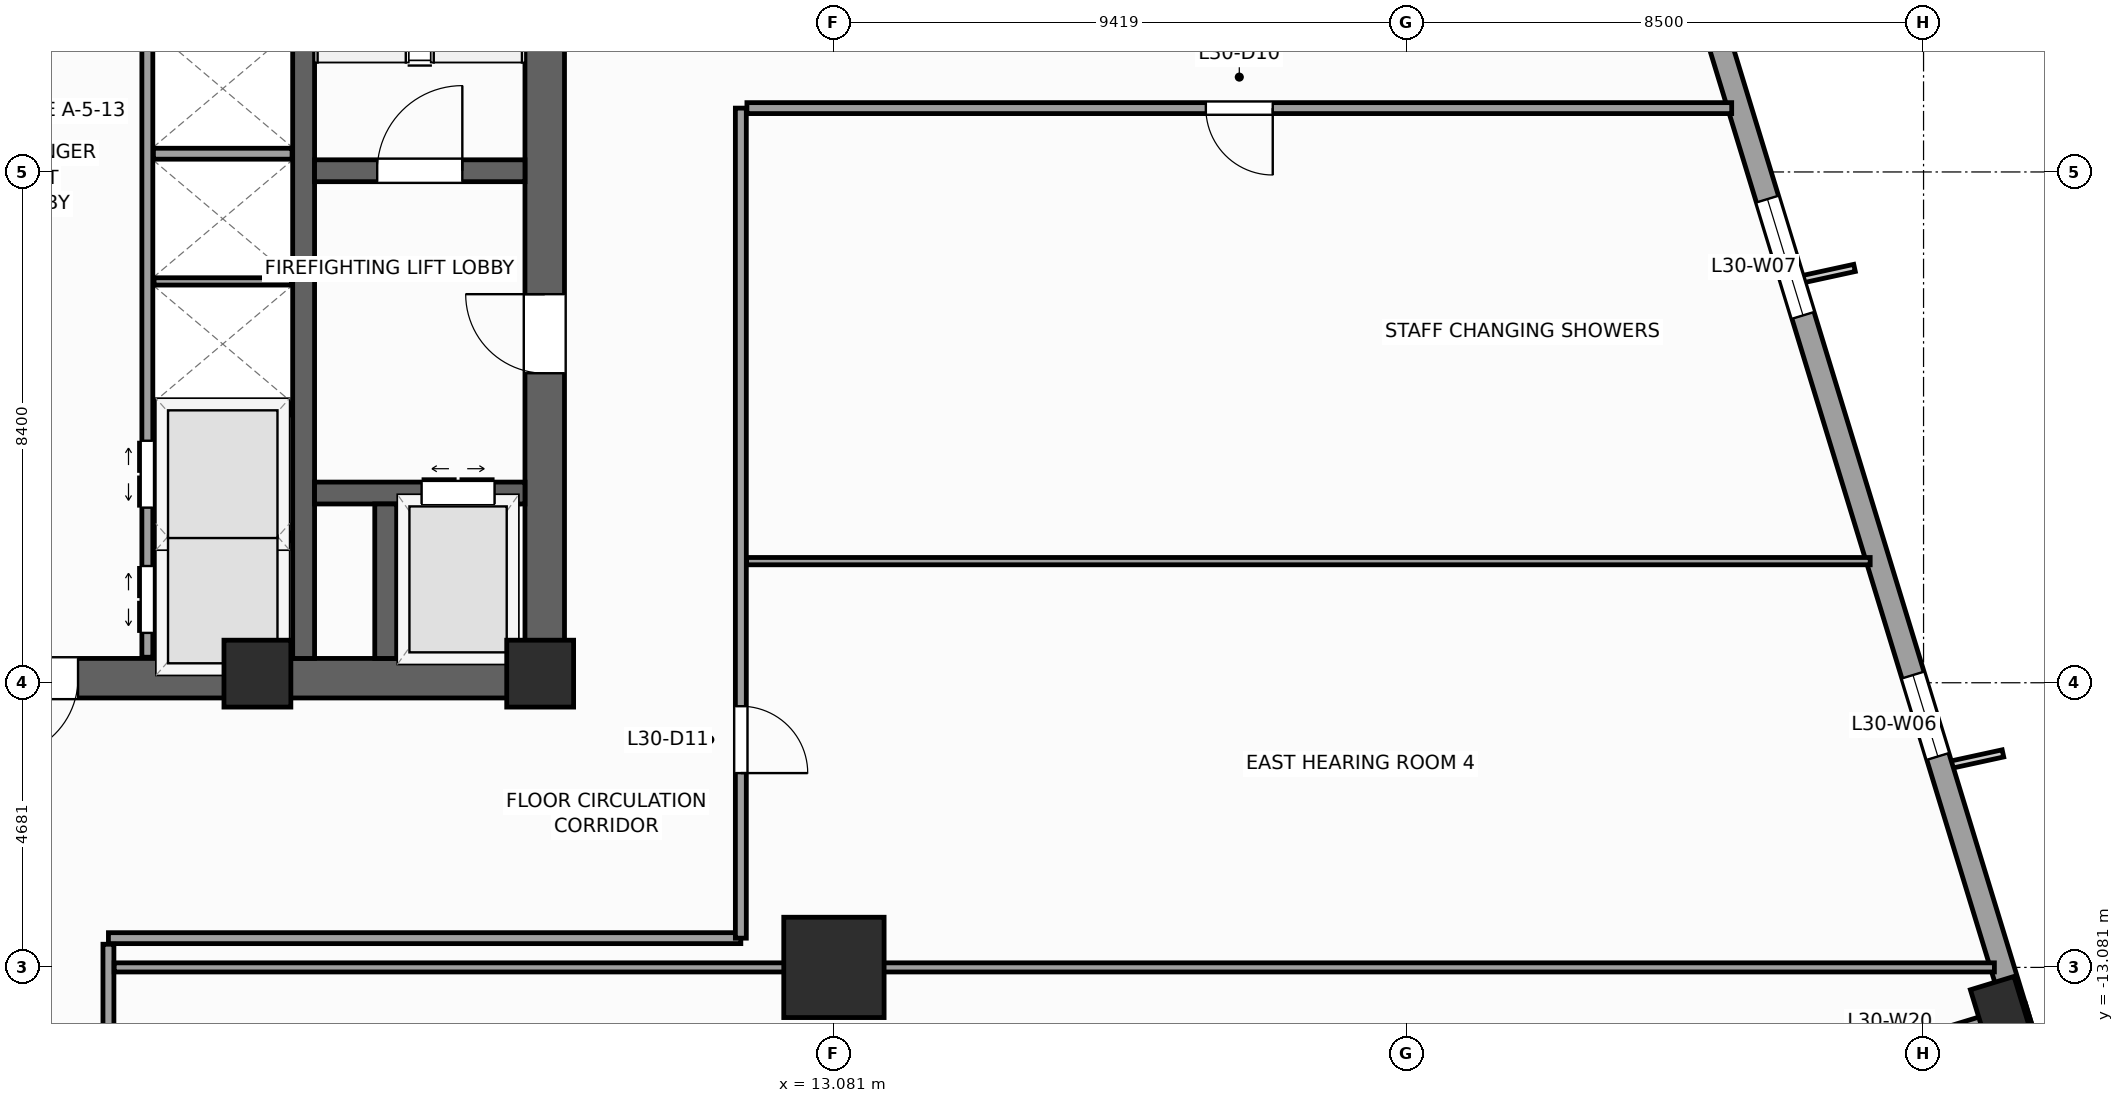
"""IFC4 building model, lengths in metres.
Left out: names, types, materials, properties, quantities, classifications, styles, units other than length and angle.
Written with IfcOpenShell. Run it as: python <this file> out.ifc"""

import sys

from ifc_helpers import new_model, si_unit, direction, frame, frame_2d, origin, origin_2d, place, context, subcontext, project, spatial, rectangle, extrude, source, transform, mapped, element, fill, save


model = new_model("IFC4")
c1 = context("Model", 3, precision=1e-05, world=origin(), true_north=direction((0.0, 1.0)))
c2 = subcontext(c1, "Body", "Model", "MODEL_VIEW")
j1 = project(units=[si_unit("LENGTHUNIT", "METRE"), si_unit("PLANEANGLEUNIT", "RADIAN")], contexts=[c1])
p1 = place(None, origin())
s1 = spatial("IfcSite", under=j1, at=p1, CompositionType="ELEMENT")
p2 = place(p1, origin())
s2 = spatial("IfcBuilding", under=s1, at=p2, CompositionType="ELEMENT")
p3 = place(p2, frame((0.0, 0.0, 127.2)))
s3 = spatial("IfcBuildingStorey", under=s2, at=p3, CompositionType="ELEMENT", Elevation=127.2)
p4 = place(p3, frame((-8.65, -8.325, 0.0), z_axis=(0.0, 0.0, 1.0), x_axis=(1.0, 0.0, 0.0)))
e1 = element("IfcWall", 1, at=p4, inside=s3, PredefinedType="SHEAR", context=c2, shape_type="SweptSolid", body=[
    extrude(rectangle(XDim=17.3, YDim=0.65, at=frame_2d((8.65, 0.0))), origin(), (0.0, 0.0, 1.0), 4.0),
])
p5 = place(p4, frame((8.0, 0.0, 0.0)))
e2 = element("IfcOpeningElement", 2, at=p5, cuts=e1, PredefinedType="OPENING", context=c2, shape_type="SweptSolid", body=[
    extrude(rectangle(XDim=1.3, YDim=2.2, at=frame_2d((0.65, 1.1))), frame((0.0, 0.335, 0.0), z_axis=(0.0, -1.0, 0.0), x_axis=(1.0, 0.0, 0.0)), (0.0, 0.0, 1.0), 0.67),
])
p6 = place(p3, frame((8.325, -8.0, 0.0), z_axis=(0.0, 0.0, 1.0), x_axis=(0.0, 1.0, 0.0)))
e3 = element("IfcWall", 3, at=p6, inside=s3, PredefinedType="SHEAR", context=c2, shape_type="SweptSolid", body=[
    extrude(rectangle(XDim=16.0, YDim=0.65, at=frame_2d((8.0, 0.0))), origin(), (0.0, 0.0, 1.0), 4.0),
])
p7 = place(p6, frame((4.69, 0.0, 0.0)))
e4 = element("IfcOpeningElement", 4, at=p7, cuts=e3, PredefinedType="OPENING", context=c2, shape_type="SweptSolid", body=[
    extrude(rectangle(XDim=1.3, YDim=2.2, at=frame_2d((0.65, 1.1))), frame((0.0, 0.335, 0.0), z_axis=(0.0, -1.0, 0.0), x_axis=(1.0, 0.0, 0.0)), (0.0, 0.0, 1.0), 0.67),
])
p8 = place(p3, frame((4.36, -8.0, 0.0), z_axis=(0.0, 0.0, 1.0), x_axis=(0.0, 1.0, 0.0)))
e5 = element("IfcWall", 5, at=p8, inside=s3, PredefinedType="SHEAR", context=c2, shape_type="SweptSolid", body=[
    extrude(rectangle(XDim=16.0, YDim=0.36, at=frame_2d((8.0, 0.0))), origin(), (0.0, 0.0, 1.0), 4.0),
])
p9 = place(p3, frame((4.54, 0.02, 0.0), z_axis=(0.0, 0.0, 1.0), x_axis=(1.0, 0.0, 0.0)))
e6 = element("IfcWall", 6, at=p9, inside=s3, PredefinedType="SHEAR", context=c2, shape_type="SweptSolid", body=[
    extrude(rectangle(XDim=3.46, YDim=0.36, at=frame_2d((1.73, 0.0))), origin(), (0.0, 0.0, 1.0), 4.0),
])
p10 = place(p9, frame((1.03, 0.0, 0.0)))
e7 = element("IfcOpeningElement", 7, at=p10, cuts=e6, PredefinedType="OPENING", context=c2, shape_type="SweptSolid", body=[
    extrude(rectangle(XDim=1.4, YDim=2.2, at=frame_2d((0.7, 1.1))), frame((0.0, 0.19, 0.0), z_axis=(0.0, -1.0, 0.0), x_axis=(1.0, 0.0, 0.0)), (0.0, 0.0, 1.0), 0.38),
])
p11 = place(p3, frame((4.54, -5.28, 0.0), z_axis=(0.0, 0.0, 1.0), x_axis=(1.0, 0.0, 0.0)))
e8 = element("IfcWall", 8, at=p11, inside=s3, PredefinedType="SHEAR", context=c2, shape_type="SweptSolid", body=[
    extrude(rectangle(XDim=3.46, YDim=0.36, at=frame_2d((1.73, 0.0))), origin(), (0.0, 0.0, 1.0), 4.0),
])
p12 = place(p11, frame((1.76, 0.0, 0.0)))
e9 = element("IfcOpeningElement", 9, at=p12, cuts=e8, PredefinedType="OPENING", context=c2, shape_type="SweptSolid", body=[
    extrude(rectangle(XDim=1.2, YDim=2.25, at=frame_2d((0.6, 1.125))), frame((0.0, 0.19, 0.0), z_axis=(0.0, -1.0, 0.0), x_axis=(1.0, 0.0, 0.0)), (0.0, 0.0, 1.0), 0.38),
])
p13 = place(p3, frame((5.71, -8.0, 0.0), z_axis=(0.0, 0.0, 1.0), x_axis=(0.0, 1.0, 0.0)))
e10 = element("IfcWall", 10, at=p13, inside=s3, PredefinedType="SHEAR", context=c2, shape_type="SweptSolid", body=[
    extrude(rectangle(XDim=2.54, YDim=0.36, at=frame_2d((1.27, 0.0))), origin(), (0.0, 0.0, 1.0), 4.0),
])
m1 = source(origin(), c2, "Body", "SweptSolid", [
    extrude(rectangle(XDim=1.1, YDim=1.1, at=origin_2d()), origin(), (0.0, 0.0, 1.0), 4.0),
])
for number, where, z_axis, x_axis in (
    (11, (8.25, -8.25, 0.0), (0.0, 0.0, 1.0), (1.0, 0.0, 0.0)),
    (12, (3.6, -8.25, 0.0), (0.0, 0.0, 1.0), (1.0, 0.0, 0.0)),
):
    element("IfcColumn", number, at=place(p3, frame(where, z_axis=z_axis, x_axis=x_axis)), inside=s3, PredefinedType="PILASTER", context=c2, shape_type="MappedRepresentation", body=[
        mapped(m1, transform((0.0, 0.0, 0.0), scale=1.0)),
    ])
m2 = source(origin(), c2, "Body", "SweptSolid", [
    extrude(rectangle(XDim=1.65, YDim=1.65, at=origin_2d()), origin(), (0.0, 0.0, 1.0), 4.0),
])
p14 = place(p3, frame((13.081, -13.081, 0.0), z_axis=(0.0, 0.0, 1.0), x_axis=(1.0, 0.0, 0.0)))
e13 = element("IfcColumn", 13, at=p14, inside=s3, PredefinedType="COLUMN", context=c2, shape_type="MappedRepresentation", body=[
    mapped(m2, transform((0.0, 0.0, 0.0), scale=1.0)),
])
m3 = source(origin(), c2, "Body", "SweptSolid", [
    extrude(rectangle(XDim=0.75, YDim=0.85, at=origin_2d()), origin(), (0.0, 0.0, 1.0), 4.0),
])
p15 = place(p3, frame((32.253, -13.746, 0.0), z_axis=(0.0, 0.0, 1.0), x_axis=(0.956304755963, 0.292371704723, 0.0)))
e14 = element("IfcColumn", 14, at=p15, inside=s3, PredefinedType="COLUMN", context=c2, shape_type="MappedRepresentation", body=[
    mapped(m3, transform((0.0, 0.0, 0.0), scale=1.0)),
])
p16 = place(p3, frame((28.482, -15.144, 0.0), z_axis=(0.0, 0.0, 1.0), x_axis=(0.956304176051, 0.292373601522, 0.0)))
e15 = element("IfcWall", 15, at=p16, inside=s3, PredefinedType="STANDARD", context=c2, shape_type="SweptSolid", body=[
    extrude(rectangle(XDim=4.44, YDim=0.38, at=frame_2d((2.22, 0.0))), origin(), (0.0, 0.0, 1.0), 3.04),
])
p17 = place(p16, frame((1.52, 0.0, 0.51)))
e16 = element("IfcOpeningElement", 16, at=p17, cuts=e15, PredefinedType="OPENING", context=c2, shape_type="SweptSolid", body=[
    extrude(rectangle(XDim=1.4, YDim=2.4, at=frame_2d((0.7, 1.2))), frame((0.0, 0.2, 0.0), z_axis=(0.0, -1.0, 0.0), x_axis=(1.0, 0.0, 0.0)), (0.0, 0.0, 1.0), 0.4),
])
p18 = place(p3, frame((32.658, -14.265, 0.0), z_axis=(0.0, 0.0, 1.0), x_axis=(-0.292373127906, 0.956304320851, 0.0)))
e17 = element("IfcWall", 17, at=p18, inside=s3, PredefinedType="STANDARD", context=c2, shape_type="SweptSolid", body=[
    extrude(rectangle(XDim=46.38, YDim=0.38, at=frame_2d((23.19, 0.0))), origin(), (0.0, 0.0, 1.0), 3.14),
])
p19 = place(p18, frame((4.865, 0.0, 0.51)))
e18 = element("IfcOpeningElement", 18, at=p19, cuts=e17, PredefinedType="OPENING", context=c2, shape_type="SweptSolid", body=[
    extrude(rectangle(XDim=1.4, YDim=2.4, at=frame_2d((0.7, 1.2))), frame((0.0, 0.2, 0.0), z_axis=(0.0, -1.0, 0.0), x_axis=(1.0, 0.0, 0.0)), (0.0, 0.0, 1.0), 0.4),
])
p20 = place(p18, frame((12.45, 0.0, 0.51)))
e19 = element("IfcOpeningElement", 19, at=p20, cuts=e17, PredefinedType="OPENING", context=c2, shape_type="SweptSolid", body=[
    extrude(rectangle(XDim=2.0, YDim=2.4, at=frame_2d((1.0, 1.2))), frame((0.0, 0.2, 0.0), z_axis=(0.0, -1.0, 0.0), x_axis=(1.0, 0.0, 0.0)), (0.0, 0.0, 1.0), 0.4),
])
p21 = place(p18, frame((30.538, 0.0, 0.51)))
e20 = element("IfcOpeningElement", 20, at=p21, cuts=e17, PredefinedType="OPENING", context=c2, shape_type="SweptSolid", body=[
    extrude(rectangle(XDim=2.0, YDim=2.4, at=frame_2d((1.0, 1.2))), frame((0.0, 0.2, 0.0), z_axis=(0.0, -1.0, 0.0), x_axis=(1.0, 0.0, 0.0)), (0.0, 0.0, 1.0), 0.4),
])
p22 = place(p18, frame((39.187, 0.0, 0.51)))
e21 = element("IfcOpeningElement", 21, at=p22, cuts=e17, PredefinedType="OPENING", context=c2, shape_type="SweptSolid", body=[
    extrude(rectangle(XDim=1.4, YDim=2.4, at=frame_2d((0.7, 1.2))), frame((0.0, 0.2, 0.0), z_axis=(0.0, -1.0, 0.0), x_axis=(1.0, 0.0, 0.0)), (0.0, 0.0, 1.0), 0.4),
])
p23 = place(p3, frame((1.79, -7.98, 0.0), z_axis=(0.0, 0.0, 1.0), x_axis=(0.0, 1.0, 0.0)))
e22 = element("IfcWall", 22, at=p23, inside=s3, PredefinedType="PARTITIONING", context=c2, shape_type="SweptSolid", body=[
    extrude(rectangle(XDim=12.38, YDim=0.18, at=frame_2d((6.19, 0.0))), origin(), (0.0, 0.0, 1.0), 3.74),
])
p24 = place(p23, frame((0.4, 0.0, 0.0)))
e23 = element("IfcOpeningElement", 23, at=p24, cuts=e22, PredefinedType="OPENING", context=c2, shape_type="SweptSolid", body=[
    extrude(rectangle(XDim=1.1, YDim=2.2, at=frame_2d((0.55, 1.1))), frame((0.0, 0.1, 0.0), z_axis=(0.0, -1.0, 0.0), x_axis=(1.0, 0.0, 0.0)), (0.0, 0.0, 1.0), 0.2),
])
p25 = place(p23, frame((2.46, 0.0, 0.0)))
e24 = element("IfcOpeningElement", 24, at=p25, cuts=e22, PredefinedType="OPENING", context=c2, shape_type="SweptSolid", body=[
    extrude(rectangle(XDim=1.1, YDim=2.2, at=frame_2d((0.55, 1.1))), frame((0.0, 0.1, 0.0), z_axis=(0.0, -1.0, 0.0), x_axis=(1.0, 0.0, 0.0)), (0.0, 0.0, 1.0), 0.2),
])
for number, where, z_axis, x_axis in (
    (25, (1.89, -3.9, 0.0), (0.0, 0.0, 1.0), (1.0, 0.0, 0.0)),
    (26, (1.89, 0.3, 0.0), (0.0, 0.0, 1.0), (1.0, 0.0, 0.0)),
):
    element("IfcWall", number, at=place(p3, frame(where, z_axis=z_axis, x_axis=x_axis)), inside=s3, PredefinedType="PARTITIONING", context=c2, shape_type="SweptSolid", body=[
        extrude(rectangle(XDim=2.28, YDim=0.18, at=frame_2d((1.14, 0.0))), origin(), (0.0, 0.0, 1.0), 3.74),
    ])
for number, where, z_axis, x_axis in (
    (27, (1.9, -6.0, 0.0), (0.0, 0.0, 1.0), (1.0, 0.0, 0.0)),
    (28, (1.9, -1.8, 0.0), (0.0, 0.0, 1.0), (1.0, 0.0, 0.0)),
):
    element("IfcWall", number, at=place(p3, frame(where, z_axis=z_axis, x_axis=x_axis)), inside=s3, PredefinedType="PARTITIONING", context=c2, shape_type="SweptSolid", body=[
        extrude(rectangle(XDim=2.26, YDim=0.12, at=frame_2d((1.13, 0.0))), origin(), (0.0, 0.0, 1.0), 3.74),
    ])
p26 = place(p3, frame((1.15, -12.6, 0.0), z_axis=(0.0, 0.0, 1.0), x_axis=(1.0, 0.0, 0.0)))
e29 = element("IfcWall", 29, at=p26, inside=s3, PredefinedType="PARTITIONING", context=c2, shape_type="SweptSolid", body=[
    extrude(rectangle(XDim=10.4, YDim=0.18, at=frame_2d((5.2, 0.0))), origin(), (0.0, 0.0, 1.0), 3.74),
])
p27 = place(p3, frame((11.55, -12.6, 0.0), z_axis=(0.0, 0.0, 1.0), x_axis=(0.0, 1.0, 0.0)))
e30 = element("IfcWall", 30, at=p27, inside=s3, PredefinedType="PARTITIONING", context=c2, shape_type="SweptSolid", body=[
    extrude(rectangle(XDim=13.65, YDim=0.18, at=frame_2d((6.825, 0.0))), origin(), (0.0, 0.0, 1.0), 3.74),
])
p28 = place(p27, frame((2.714, 0.0, 0.0)))
e31 = element("IfcOpeningElement", 31, at=p28, cuts=e30, PredefinedType="OPENING", context=c2, shape_type="SweptSolid", body=[
    extrude(rectangle(XDim=1.1, YDim=2.2, at=frame_2d((0.55, 1.1))), frame((0.0, 0.1, 0.0), z_axis=(0.0, -1.0, 0.0), x_axis=(1.0, 0.0, 0.0)), (0.0, 0.0, 1.0), 0.2),
])
p29 = place(p3, frame((11.65, 1.05, 0.0), z_axis=(0.0, 0.0, 1.0), x_axis=(1.0, 0.0, 0.0)))
e32 = element("IfcWall", 32, at=p29, inside=s3, PredefinedType="PARTITIONING", context=c2, shape_type="SweptSolid", body=[
    extrude(rectangle(XDim=16.195, YDim=0.18, at=frame_2d((8.097, 0.0))), origin(), (0.0, 0.0, 1.0), 3.74),
])
p30 = place(p29, frame((7.547, 0.0, 0.0)))
e33 = element("IfcOpeningElement", 33, at=p30, cuts=e32, PredefinedType="OPENING", context=c2, shape_type="SweptSolid", body=[
    extrude(rectangle(XDim=1.1, YDim=2.2, at=frame_2d((0.55, 1.1))), frame((0.0, 0.1, 0.0), z_axis=(0.0, -1.0, 0.0), x_axis=(1.0, 0.0, 0.0)), (0.0, 0.0, 1.0), 0.2),
])
p31 = place(p3, frame((1.15, -27.814, 0.0), z_axis=(0.0, 0.0, 1.0), x_axis=(0.0, 1.0, 0.0)))
e34 = element("IfcWall", 34, at=p31, inside=s3, PredefinedType="PARTITIONING", context=c2, shape_type="SweptSolid", body=[
    extrude(rectangle(XDim=15.114, YDim=0.18, at=frame_2d((7.557, 0.0))), origin(), (0.0, 0.0, 1.0), 3.74),
])
p32 = place(p31, frame((6.981, 0.0, 0.0)))
e35 = element("IfcOpeningElement", 35, at=p32, cuts=e34, PredefinedType="OPENING", context=c2, shape_type="SweptSolid", body=[
    extrude(rectangle(XDim=1.1, YDim=2.2, at=frame_2d((0.55, 1.1))), frame((0.0, 0.1, 0.0), z_axis=(0.0, -1.0, 0.0), x_axis=(1.0, 0.0, 0.0)), (0.0, 0.0, 1.0), 0.2),
])
p33 = place(p3, frame((1.245, -13.081, 0.0), z_axis=(0.0, 0.0, 1.0), x_axis=(1.0, 0.0, 0.0)))
e36 = element("IfcWall", 36, at=p33, inside=s3, PredefinedType="PARTITIONING", context=c2, shape_type="SweptSolid", body=[
    extrude(rectangle(XDim=30.92, YDim=0.15, at=frame_2d((15.46, 0.0))), origin(), (0.0, 0.0, 1.0), 2.732),
])
p34 = place(p3, frame((11.645, -6.4, 0.0), z_axis=(0.0, 0.0, 1.0), x_axis=(1.0, 0.0, 0.0)))
e37 = element("IfcWall", 37, at=p34, inside=s3, PredefinedType="PARTITIONING", context=c2, shape_type="SweptSolid", body=[
    extrude(rectangle(XDim=18.477, YDim=0.12, at=frame_2d((9.239, 0.0))), origin(), (0.0, 0.0, 1.0), 3.74),
])
m4 = source(origin(), c2, "Body", "SweptSolid", [
    extrude(rectangle(XDim=1.4, YDim=2.4, at=frame_2d((0.7, 1.2))), frame((0.0, 0.03, 0.0), z_axis=(0.0, -1.0, 0.0), x_axis=(1.0, 0.0, 0.0)), (0.0, 0.0, 1.0), 0.06),
])
p35 = place(p19, origin())
e38 = element("IfcWindow", 38, at=p35, inside=s3, PartitioningType="SINGLE_PANEL", PredefinedType="WINDOW", context=c2, shape_type="MappedRepresentation", body=[
    mapped(m4, transform((0.0, 0.0, 0.0), scale=1.0)),
])
fill(e18, e38)
m5 = source(origin(), c2, "Body", "SweptSolid", [
    extrude(rectangle(XDim=2.0, YDim=2.4, at=frame_2d((1.0, 1.2))), frame((0.0, 0.03, 0.0), z_axis=(0.0, -1.0, 0.0), x_axis=(1.0, 0.0, 0.0)), (0.0, 0.0, 1.0), 0.06),
])
p36 = place(p20, origin())
e39 = element("IfcWindow", 39, at=p36, inside=s3, PartitioningType="SINGLE_PANEL", PredefinedType="WINDOW", context=c2, shape_type="MappedRepresentation", body=[
    mapped(m5, transform((0.0, 0.0, 0.0), scale=1.0)),
])
fill(e19, e39)
m6 = source(origin(), c2, "Body", "SweptSolid", [
    extrude(rectangle(XDim=1.4, YDim=2.2, at=frame_2d((0.7, 1.1))), frame((0.0, 0.025, 0.0), z_axis=(0.0, -1.0, 0.0), x_axis=(1.0, 0.0, 0.0)), (0.0, 0.0, 1.0), 0.05),
])
p37 = place(p10, origin())
e40 = element("IfcDoor", 40, at=p37, inside=s3, OperationType="SINGLE_SWING_RIGHT", PredefinedType="DOOR", context=c2, shape_type="MappedRepresentation", body=[
    mapped(m6, transform((0.0, 0.0, 0.0), scale=1.0)),
])
fill(e7, e40)
m7 = source(origin(), c2, "Body", "SweptSolid", [
    extrude(rectangle(XDim=1.3, YDim=2.2, at=frame_2d((0.65, 1.1))), frame((0.0, 0.025, 0.0), z_axis=(0.0, -1.0, 0.0), x_axis=(1.0, 0.0, 0.0)), (0.0, 0.0, 1.0), 0.05),
])
p38 = place(p7, origin())
e41 = element("IfcDoor", 41, at=p38, inside=s3, OperationType="SINGLE_SWING_RIGHT", PredefinedType="DOOR", context=c2, shape_type="MappedRepresentation", body=[
    mapped(m7, transform((0.0, 0.0, 0.0), scale=1.0)),
])
fill(e4, e41)
p39 = place(p5, frame((1.3, 0.0, 0.0), z_axis=(0.0, 0.0, 1.0), x_axis=(-1.0, 0.0, 0.0)))
e42 = element("IfcDoor", 42, at=p39, inside=s3, OperationType="SINGLE_SWING_LEFT", PredefinedType="DOOR", context=c2, shape_type="MappedRepresentation", body=[
    mapped(m7, transform((0.0, 0.0, 0.0), scale=1.0)),
])
fill(e2, e42)
m8 = source(origin(), c2, "Body", "SweptSolid", [
    extrude(rectangle(XDim=1.2, YDim=2.25, at=frame_2d((0.6, 1.125))), frame((0.0, 0.025, 0.0), z_axis=(0.0, -1.0, 0.0), x_axis=(1.0, 0.0, 0.0)), (0.0, 0.0, 1.0), 0.05),
])
p40 = place(p12, origin())
e43 = element("IfcDoor", 43, at=p40, inside=s3, OperationType="DOUBLE_DOOR_SLIDING", PredefinedType="DOOR", context=c2, shape_type="MappedRepresentation", body=[
    mapped(m8, transform((0.0, 0.0, 0.0), scale=1.0)),
])
fill(e9, e43)
m9 = source(origin(), c2, "Body", "SweptSolid", [
    extrude(rectangle(XDim=1.1, YDim=2.2, at=frame_2d((0.55, 1.1))), frame((0.0, 0.025, 0.0), z_axis=(0.0, -1.0, 0.0), x_axis=(1.0, 0.0, 0.0)), (0.0, 0.0, 1.0), 0.05),
])
p41 = place(p24, origin())
e44 = element("IfcDoor", 44, at=p41, inside=s3, OperationType="DOUBLE_DOOR_SLIDING", PredefinedType="DOOR", context=c2, shape_type="MappedRepresentation", body=[
    mapped(m9, transform((0.0, 0.0, 0.0), scale=1.0)),
])
fill(e23, e44)
p42 = place(p25, origin())
e45 = element("IfcDoor", 45, at=p42, inside=s3, OperationType="DOUBLE_DOOR_SLIDING", PredefinedType="DOOR", context=c2, shape_type="MappedRepresentation", body=[
    mapped(m9, transform((0.0, 0.0, 0.0), scale=1.0)),
])
fill(e24, e45)
p43 = place(p30, frame((1.1, 0.0, 0.0), z_axis=(0.0, 0.0, 1.0), x_axis=(-1.0, 0.0, 0.0)))
e46 = element("IfcDoor", 46, at=p43, inside=s3, OperationType="SINGLE_SWING_RIGHT", PredefinedType="DOOR", context=c2, shape_type="MappedRepresentation", body=[
    mapped(m9, transform((0.0, 0.0, 0.0), scale=1.0)),
])
fill(e33, e46)
p44 = place(p28, frame((1.1, 0.0, 0.0), z_axis=(0.0, 0.0, 1.0), x_axis=(-1.0, 0.0, 0.0)))
e47 = element("IfcDoor", 47, at=p44, inside=s3, OperationType="SINGLE_SWING_LEFT", PredefinedType="DOOR", context=c2, shape_type="MappedRepresentation", body=[
    mapped(m9, transform((0.0, 0.0, 0.0), scale=1.0)),
])
fill(e31, e47)
save(model, sys.argv[1])
